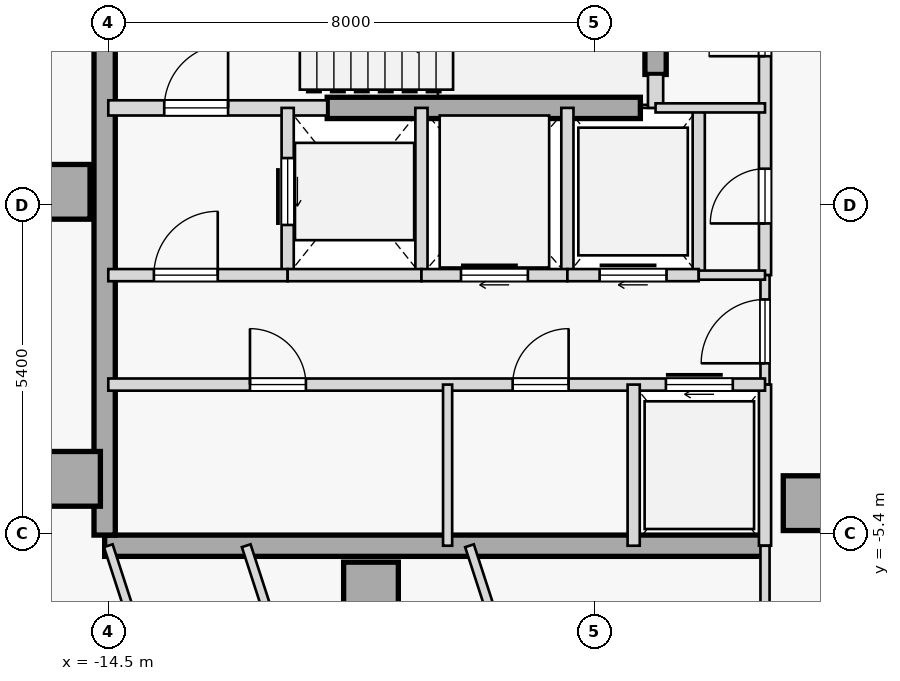
"""IFC4 building model, lengths in metres.
Left out: names, types, materials, properties, quantities, classifications, styles, units other than length and angle.
Written with IfcOpenShell. Run it as: python <this file> out.ifc"""

import sys

from ifc_helpers import new_model, si_unit, direction, frame, frame_2d, origin, origin_2d, place, context, subcontext, project, spatial, rectangle, extrude, element, fill, save


model = new_model("IFC4")
c1 = context("Model", 3, precision=1e-05, world=origin(), true_north=direction((0.0, 1.0)))
c2 = subcontext(c1, "Body", "Model", "MODEL_VIEW")
j1 = project(units=[si_unit("LENGTHUNIT", "METRE"), si_unit("PLANEANGLEUNIT", "RADIAN")], contexts=[c1])
p1 = place(None, origin())
s1 = spatial("IfcSite", under=j1, at=p1, CompositionType="ELEMENT")
p2 = place(p1, origin())
s2 = spatial("IfcBuilding", under=s1, at=p2, CompositionType="ELEMENT")
p3 = place(p2, frame((0.0, 0.0, 217.6)))
s3 = spatial("IfcBuildingStorey", under=s2, at=p3, CompositionType="ELEMENT", Elevation=217.6)
for number, where, z_axis, x_axis in (
    (1, (-15.25, 0.22, 0.0), (0.0, 0.0, 1.0), (1.0, 0.0, 0.0)),
    (2, (-15.08, -4.5, 0.0), (0.0, 0.0, 1.0), (1.0, 0.0, 0.0)),
    (3, (-10.18, -6.32, 0.0), (0.0, 0.0, 1.0), (1.0, 0.0, 0.0)),
    (4, (-2.95, -4.9, 0.0), (0.0, 0.0, 1.0), (1.0, 0.0, 0.0)),
):
    element("IfcColumn", number, at=place(p3, frame(where, z_axis=z_axis, x_axis=x_axis)), inside=s3, PredefinedType="COLUMN", context=c2, shape_type="SweptSolid", body=[
        extrude(rectangle(XDim=0.9, YDim=0.9, at=origin_2d()), origin(), (0.0, 0.0, 1.0), 3.35),
    ])
p4 = place(p3, frame((-14.56, -5.6, 0.0), z_axis=(0.0, 0.0, 1.0), x_axis=(1.0, 0.0, 0.0)))
e5 = element("IfcWall", 5, at=p4, inside=s3, PredefinedType="SHEAR", context=c2, shape_type="SweptSolid", body=[
    extrude(rectangle(XDim=10.86, YDim=0.35, at=frame_2d((5.43, 0.0))), origin(), (0.0, 0.0, 1.0), 3.125),
])
p5 = place(p3, frame((-14.56, -5.425, 0.0), z_axis=(0.0, 0.0, 1.0), x_axis=(0.0, 1.0, 0.0)))
e6 = element("IfcWall", 6, at=p5, inside=s3, PredefinedType="SHEAR", context=c2, shape_type="SweptSolid", body=[
    extrude(rectangle(XDim=10.85, YDim=0.35, at=frame_2d((5.425, 0.0))), origin(), (0.0, 0.0, 1.0), 3.125),
])
p6 = place(p3, frame((-5.5, 2.15, 0.0), z_axis=(0.0, 0.0, 1.0), x_axis=(0.0, 1.0, 0.0)))
e7 = element("IfcWall", 7, at=p6, inside=s3, PredefinedType="SHEAR", context=c2, shape_type="SweptSolid", body=[
    extrude(rectangle(XDim=3.275, YDim=0.35, at=frame_2d((1.638, 0.0))), origin(), (0.0, 0.0, 1.0), 3.125),
])
p7 = place(p3, frame((-10.9, 1.6, 0.0), z_axis=(0.0, 0.0, 1.0), x_axis=(1.0, 0.0, 0.0)))
e8 = element("IfcWall", 8, at=p7, inside=s3, PredefinedType="SHEAR", context=c2, shape_type="SweptSolid", body=[
    extrude(rectangle(XDim=5.15, YDim=0.35, at=frame_2d((2.575, 0.0))), origin(), (0.0, 0.0, 1.0), 3.125),
])
p8 = place(p3, frame((-14.5, 1.6, 0.0), z_axis=(0.0, 0.0, 1.0), x_axis=(1.0, 0.0, 0.0)))
e9 = element("IfcWall", 9, at=p8, inside=s3, PredefinedType="STANDARD", context=c2, shape_type="SweptSolid", body=[
    extrude(rectangle(XDim=3.6, YDim=0.25, at=frame_2d((1.8, 0.0))), origin(), (0.0, 0.0, 1.0), 3.125),
])
p9 = place(p8, frame((0.92, 0.0, 0.0)))
e10 = element("IfcOpeningElement", 10, at=p9, cuts=e9, PredefinedType="OPENING", context=c2, shape_type="SweptSolid", body=[
    extrude(rectangle(XDim=1.05, YDim=2.15, at=frame_2d((0.525, 1.075))), frame((0.0, 0.135, 0.0), z_axis=(0.0, -1.0, 0.0), x_axis=(1.0, 0.0, 0.0)), (0.0, 0.0, 1.0), 0.27),
])
p10 = place(p3, frame((-5.5, 1.6, 0.0), z_axis=(0.0, 0.0, 1.0), x_axis=(0.0, 1.0, 0.0)))
e11 = element("IfcWall", 11, at=p10, inside=s3, PredefinedType="STANDARD", context=c2, shape_type="SweptSolid", body=[
    extrude(rectangle(XDim=0.55, YDim=0.25, at=frame_2d((0.275, 0.0))), origin(), (0.0, 0.0, 1.0), 3.125),
])
p11 = place(p3, frame((-3.7, -1.15, 0.0), z_axis=(0.0, 0.0, 1.0), x_axis=(0.0, 1.0, 0.0)))
e12 = element("IfcWall", 12, at=p11, inside=s3, PredefinedType="STANDARD", context=c2, shape_type="SweptSolid", body=[
    extrude(rectangle(XDim=6.75, YDim=0.2, at=frame_2d((3.375, 0.0))), origin(), (0.0, 0.0, 1.0), 3.125),
])
p12 = place(p11, frame((3.6, 0.0, 0.0)))
e13 = element("IfcOpeningElement", 13, at=p12, cuts=e12, PredefinedType="OPENING", context=c2, shape_type="SweptSolid", body=[
    extrude(rectangle(XDim=0.92, YDim=2.15, at=frame_2d((0.46, 1.075))), frame((0.0, 0.11, 0.0), z_axis=(0.0, -1.0, 0.0), x_axis=(1.0, 0.0, 0.0)), (0.0, 0.0, 1.0), 0.22),
])
p13 = place(p11, frame((0.85, 0.0, 0.0)))
e14 = element("IfcOpeningElement", 14, at=p13, cuts=e12, PredefinedType="OPENING", context=c2, shape_type="SweptSolid", body=[
    extrude(rectangle(XDim=0.9, YDim=2.15, at=frame_2d((0.45, 1.075))), frame((0.0, 0.11, 0.0), z_axis=(0.0, -1.0, 0.0), x_axis=(1.0, 0.0, 0.0)), (0.0, 0.0, 1.0), 0.22),
])
p14 = place(p3, frame((-3.7, -2.95, 0.0), z_axis=(0.0, 0.0, 1.0), x_axis=(0.0, 1.0, 0.0)))
e15 = element("IfcWall", 15, at=p14, inside=s3, PredefinedType="PARTITIONING", context=c2, shape_type="SweptSolid", body=[
    extrude(rectangle(XDim=1.8, YDim=0.15, at=frame_2d((0.9, 0.0))), origin(), (0.0, 0.0, 1.0), 3.125),
])
p15 = place(p14, frame((0.35, 0.0, 0.0)))
e16 = element("IfcOpeningElement", 16, at=p15, cuts=e15, PredefinedType="OPENING", context=c2, shape_type="SweptSolid", body=[
    extrude(rectangle(XDim=1.05, YDim=2.18, at=frame_2d((0.525, 1.09))), frame((0.0, 0.085, 0.0), z_axis=(0.0, -1.0, 0.0), x_axis=(1.0, 0.0, 0.0)), (0.0, 0.0, 1.0), 0.17),
])
p16 = place(p3, frame((-3.7, -5.6, 0.0), z_axis=(0.0, 0.0, 1.0), x_axis=(0.0, 1.0, 0.0)))
e17 = element("IfcWall", 17, at=p16, inside=s3, PredefinedType="STANDARD", context=c2, shape_type="SweptSolid", body=[
    extrude(rectangle(XDim=2.65, YDim=0.2, at=frame_2d((1.325, 0.0))), origin(), (0.0, 0.0, 1.0), 3.125),
])
p17 = place(p3, frame((-11.55, -1.15, 0.0), z_axis=(0.0, 0.0, 1.0), x_axis=(0.0, 1.0, 0.0)))
e18 = element("IfcWall", 18, at=p17, inside=s3, PredefinedType="STANDARD", context=c2, shape_type="SweptSolid", body=[
    extrude(rectangle(XDim=2.75, YDim=0.2, at=frame_2d((1.375, 0.0))), origin(), (0.0, 0.0, 1.0), 3.125),
])
p18 = place(p17, frame((0.825, 0.0, 0.0)))
e19 = element("IfcOpeningElement", 19, at=p18, cuts=e18, PredefinedType="OPENING", context=c2, shape_type="SweptSolid", body=[
    extrude(rectangle(XDim=1.1, YDim=2.15, at=frame_2d((0.55, 1.075))), frame((0.0, 0.11, 0.0), z_axis=(0.0, -1.0, 0.0), x_axis=(1.0, 0.0, 0.0)), (0.0, 0.0, 1.0), 0.22),
])
p19 = place(p3, frame((-9.35, -1.15, 0.0), z_axis=(0.0, 0.0, 1.0), x_axis=(0.0, 1.0, 0.0)))
e20 = element("IfcWall", 20, at=p19, inside=s3, PredefinedType="STANDARD", context=c2, shape_type="SweptSolid", body=[
    extrude(rectangle(XDim=2.75, YDim=0.2, at=frame_2d((1.375, 0.0))), origin(), (0.0, 0.0, 1.0), 3.125),
])
p20 = place(p3, frame((-14.5, -1.15, 0.0), z_axis=(0.0, 0.0, 1.0), x_axis=(1.0, 0.0, 0.0)))
e21 = element("IfcWall", 21, at=p20, inside=s3, PredefinedType="STANDARD", context=c2, shape_type="SweptSolid", body=[
    extrude(rectangle(XDim=2.95, YDim=0.2, at=frame_2d((1.475, 0.0))), origin(), (0.0, 0.0, 1.0), 3.125),
])
p21 = place(p20, frame((0.75, 0.0, 0.0)))
e22 = element("IfcOpeningElement", 22, at=p21, cuts=e21, PredefinedType="OPENING", context=c2, shape_type="SweptSolid", body=[
    extrude(rectangle(XDim=1.05, YDim=2.18, at=frame_2d((0.525, 1.09))), frame((0.0, 0.11, 0.0), z_axis=(0.0, -1.0, 0.0), x_axis=(1.0, 0.0, 0.0)), (0.0, 0.0, 1.0), 0.22),
])
p22 = place(p3, frame((-11.55, -1.15, 0.0), z_axis=(0.0, 0.0, 1.0), x_axis=(1.0, 0.0, 0.0)))
e23 = element("IfcWall", 23, at=p22, inside=s3, PredefinedType="STANDARD", context=c2, shape_type="SweptSolid", body=[
    extrude(rectangle(XDim=2.2, YDim=0.2, at=frame_2d((1.1, 0.0))), origin(), (0.0, 0.0, 1.0), 3.125),
])
p23 = place(p3, frame((-6.95, -1.15, 0.0), z_axis=(0.0, 0.0, 1.0), x_axis=(0.0, 1.0, 0.0)))
e24 = element("IfcWall", 24, at=p23, inside=s3, PredefinedType="STANDARD", context=c2, shape_type="SweptSolid", body=[
    extrude(rectangle(XDim=2.75, YDim=0.2, at=frame_2d((1.375, 0.0))), origin(), (0.0, 0.0, 1.0), 3.125),
])
p24 = place(p3, frame((-9.35, -1.15, 0.0), z_axis=(0.0, 0.0, 1.0), x_axis=(1.0, 0.0, 0.0)))
e25 = element("IfcWall", 25, at=p24, inside=s3, PredefinedType="STANDARD", context=c2, shape_type="SweptSolid", body=[
    extrude(rectangle(XDim=2.4, YDim=0.2, at=frame_2d((1.2, 0.0))), origin(), (0.0, 0.0, 1.0), 3.125),
])
p25 = place(p24, frame((0.65, 0.0, 0.0)))
e26 = element("IfcOpeningElement", 26, at=p25, cuts=e25, PredefinedType="OPENING", context=c2, shape_type="SweptSolid", body=[
    extrude(rectangle(XDim=1.1, YDim=2.15, at=frame_2d((0.55, 1.075))), frame((0.0, 0.11, 0.0), z_axis=(0.0, -1.0, 0.0), x_axis=(1.0, 0.0, 0.0)), (0.0, 0.0, 1.0), 0.22),
])
p26 = place(p3, frame((-4.79, -1.15, 0.0), z_axis=(0.0, 0.0, 1.0), x_axis=(0.0, 1.0, 0.0)))
e27 = element("IfcWall", 27, at=p26, inside=s3, PredefinedType="STANDARD", context=c2, shape_type="SweptSolid", body=[
    extrude(rectangle(XDim=2.75, YDim=0.2, at=frame_2d((1.375, 0.0))), origin(), (0.0, 0.0, 1.0), 3.125),
])
p27 = place(p3, frame((-6.95, -1.15, 0.0), z_axis=(0.0, 0.0, 1.0), x_axis=(1.0, 0.0, 0.0)))
e28 = element("IfcWall", 28, at=p27, inside=s3, PredefinedType="STANDARD", context=c2, shape_type="SweptSolid", body=[
    extrude(rectangle(XDim=2.16, YDim=0.2, at=frame_2d((1.08, 0.0))), origin(), (0.0, 0.0, 1.0), 3.125),
])
p28 = place(p27, frame((0.53, 0.0, 0.0)))
e29 = element("IfcOpeningElement", 29, at=p28, cuts=e28, PredefinedType="OPENING", context=c2, shape_type="SweptSolid", body=[
    extrude(rectangle(XDim=1.1, YDim=2.15, at=frame_2d((0.55, 1.075))), frame((0.0, 0.11, 0.0), z_axis=(0.0, -1.0, 0.0), x_axis=(1.0, 0.0, 0.0)), (0.0, 0.0, 1.0), 0.22),
])
p29 = place(p3, frame((-4.79, -1.15, 0.0), z_axis=(0.0, 0.0, 1.0), x_axis=(1.0, 0.0, 0.0)))
e30 = element("IfcWall", 30, at=p29, inside=s3, PredefinedType="PARTITIONING", context=c2, shape_type="SweptSolid", body=[
    extrude(rectangle(XDim=1.09, YDim=0.15, at=frame_2d((0.545, 0.0))), origin(), (0.0, 0.0, 1.0), 3.125),
])
p30 = place(p3, frame((-14.5, -2.95, 0.0), z_axis=(0.0, 0.0, 1.0), x_axis=(1.0, 0.0, 0.0)))
e31 = element("IfcWall", 31, at=p30, inside=s3, PredefinedType="STANDARD", context=c2, shape_type="SweptSolid", body=[
    extrude(rectangle(XDim=10.8, YDim=0.2, at=frame_2d((5.4, 0.0))), origin(), (0.0, 0.0, 1.0), 3.125),
])
p31 = place(p30, frame((9.17, 0.0, 0.0)))
e32 = element("IfcOpeningElement", 32, at=p31, cuts=e31, PredefinedType="OPENING", context=c2, shape_type="SweptSolid", body=[
    extrude(rectangle(XDim=1.1, YDim=2.15, at=frame_2d((0.55, 1.075))), frame((0.0, 0.11, 0.0), z_axis=(0.0, -1.0, 0.0), x_axis=(1.0, 0.0, 0.0)), (0.0, 0.0, 1.0), 0.22),
])
p32 = place(p30, frame((2.33, 0.0, 0.0)))
e33 = element("IfcOpeningElement", 33, at=p32, cuts=e31, PredefinedType="OPENING", context=c2, shape_type="SweptSolid", body=[
    extrude(rectangle(XDim=0.92, YDim=2.15, at=frame_2d((0.46, 1.075))), frame((0.0, 0.11, 0.0), z_axis=(0.0, -1.0, 0.0), x_axis=(1.0, 0.0, 0.0)), (0.0, 0.0, 1.0), 0.22),
])
p33 = place(p30, frame((6.65, 0.0, 0.0)))
e34 = element("IfcOpeningElement", 34, at=p33, cuts=e31, PredefinedType="OPENING", context=c2, shape_type="SweptSolid", body=[
    extrude(rectangle(XDim=0.92, YDim=2.15, at=frame_2d((0.46, 1.075))), frame((0.0, 0.11, 0.0), z_axis=(0.0, -1.0, 0.0), x_axis=(1.0, 0.0, 0.0)), (0.0, 0.0, 1.0), 0.22),
])
p34 = place(p3, frame((-5.86, -5.6, 0.0), z_axis=(0.0, 0.0, 1.0), x_axis=(0.0, 1.0, 0.0)))
e35 = element("IfcWall", 35, at=p34, inside=s3, PredefinedType="STANDARD", context=c2, shape_type="SweptSolid", body=[
    extrude(rectangle(XDim=2.65, YDim=0.2, at=frame_2d((1.325, 0.0))), origin(), (0.0, 0.0, 1.0), 3.125),
])
p35 = place(p3, frame((-8.92, -5.6, 0.0), z_axis=(0.0, 0.0, 1.0), x_axis=(0.0, 1.0, 0.0)))
e36 = element("IfcWall", 36, at=p35, inside=s3, PredefinedType="PARTITIONING", context=c2, shape_type="SweptSolid", body=[
    extrude(rectangle(XDim=2.65, YDim=0.15, at=frame_2d((1.325, 0.0))), origin(), (0.0, 0.0, 1.0), 3.125),
])
p36 = place(p3, frame((-5.5, 1.6, 0.0), z_axis=(0.0, 0.0, 1.0), x_axis=(1.0, 0.0, 0.0)))
e37 = element("IfcWall", 37, at=p36, inside=s3, PredefinedType="PARTITIONING", context=c2, shape_type="SweptSolid", body=[
    extrude(rectangle(XDim=1.8, YDim=0.15, at=frame_2d((0.9, 0.0))), origin(), (0.0, 0.0, 1.0), 3.125),
])
p37 = place(p3, frame((-3.7, -11.514, 0.0), z_axis=(0.0, 0.0, 1.0), x_axis=(-8.2572974e-05, 0.999999996591, 0.0)))
e38 = element("IfcWall", 38, at=p37, inside=s3, PredefinedType="PARTITIONING", context=c2, shape_type="SweptSolid", body=[
    extrude(rectangle(XDim=5.913, YDim=0.15, at=frame_2d((2.957, 0.0))), origin(), (0.0, 0.0, 1.0), 3.125),
])
p38 = place(p37, frame((2.497, 0.0, 0.0)))
e39 = element("IfcOpeningElement", 39, at=p38, cuts=e38, PredefinedType="OPENING", context=c2, shape_type="SweptSolid", body=[
    extrude(rectangle(XDim=0.92, YDim=2.15, at=frame_2d((0.46, 1.075))), frame((0.0, 0.085, 0.0), z_axis=(0.0, -1.0, 0.0), x_axis=(1.0, 0.0, 0.0)), (0.0, 0.0, 1.0), 0.17),
])
p39 = place(p3, frame((-30.663, -9.757, 0.0), z_axis=(0.0, 0.0, 1.0), x_axis=(0.951058192995, 0.309011833974, 0.0)))
e40 = element("IfcWall", 40, at=p39, inside=s3, PredefinedType="PARTITIONING", context=c2, shape_type="SweptSolid", body=[
    extrude(rectangle(XDim=16.657, YDim=0.15, at=frame_2d((8.329, 0.0))), origin(), (0.0, 0.0, 1.0), 3.125),
])
p40 = place(p3, frame((-13.488, -8.713, 0.0), z_axis=(0.0, 0.0, 1.0), x_axis=(-0.309082700143, 0.951035164687, 0.0)))
e41 = element("IfcWall", 41, at=p40, inside=s3, PredefinedType="PARTITIONING", context=c2, shape_type="SweptSolid", body=[
    extrude(rectangle(XDim=3.274, YDim=0.15, at=frame_2d((1.637, 0.0))), origin(), (0.0, 0.0, 1.0), 3.125),
])
p41 = place(p3, frame((-9.679, -13.457, 0.0), z_axis=(0.0, 0.0, 1.0), x_axis=(-0.309010558951, 0.951058607267, 0.0)))
e42 = element("IfcWall", 42, at=p41, inside=s3, PredefinedType="PARTITIONING", context=c2, shape_type="SweptSolid", body=[
    extrude(rectangle(XDim=8.261, YDim=0.15, at=frame_2d((4.13, 0.0))), origin(), (0.0, 0.0, 1.0), 3.125),
])
p42 = place(p3, frame((-6.358, -12.377, 0.0), z_axis=(0.0, 0.0, 1.0), x_axis=(-0.309024097906, 0.951054208189, 0.0)))
e43 = element("IfcWall", 43, at=p42, inside=s3, PredefinedType="PARTITIONING", context=c2, shape_type="SweptSolid", body=[
    extrude(rectangle(XDim=7.126, YDim=0.15, at=frame_2d((3.563, 0.0))), origin(), (0.0, 0.0, 1.0), 2.675),
])
p43 = place(p9, origin())
e44 = element("IfcDoor", 44, at=p43, inside=s3, OperationType="SINGLE_SWING_RIGHT", PredefinedType="DOOR", context=c2, shape_type="SweptSolid", body=[
    extrude(rectangle(XDim=1.05, YDim=2.15, at=frame_2d((0.525, 1.075))), frame((0.0, 0.025, 0.0), z_axis=(0.0, -1.0, 0.0), x_axis=(1.0, 0.0, 0.0)), (0.0, 0.0, 1.0), 0.05),
])
fill(e10, e44)
p44 = place(p21, origin())
e45 = element("IfcDoor", 45, at=p44, inside=s3, OperationType="SINGLE_SWING_RIGHT", PredefinedType="DOOR", context=c2, shape_type="SweptSolid", body=[
    extrude(rectangle(XDim=1.05, YDim=2.18, at=frame_2d((0.525, 1.09))), frame((0.0, 0.025, 0.0), z_axis=(0.0, -1.0, 0.0), x_axis=(1.0, 0.0, 0.0)), (0.0, 0.0, 1.0), 0.05),
])
fill(e22, e45)
p45 = place(p15, origin())
e46 = element("IfcDoor", 46, at=p45, inside=s3, OperationType="SINGLE_SWING_LEFT", PredefinedType="DOOR", context=c2, shape_type="SweptSolid", body=[
    extrude(rectangle(XDim=1.05, YDim=2.18, at=frame_2d((0.525, 1.09))), frame((0.0, 0.025, 0.0), z_axis=(0.0, -1.0, 0.0), x_axis=(1.0, 0.0, 0.0)), (0.0, 0.0, 1.0), 0.05),
])
fill(e16, e46)
p46 = place(p18, origin())
e47 = element("IfcDoor", 47, at=p46, inside=s3, OperationType="SLIDING_TO_RIGHT", PredefinedType="DOOR", context=c2, shape_type="SweptSolid", body=[
    extrude(rectangle(XDim=1.1, YDim=2.15, at=frame_2d((0.55, 1.075))), frame((0.0, 0.025, 0.0), z_axis=(0.0, -1.0, 0.0), x_axis=(1.0, 0.0, 0.0)), (0.0, 0.0, 1.0), 0.05),
])
fill(e19, e47)
p47 = place(p25, origin())
e48 = element("IfcDoor", 48, at=p47, inside=s3, OperationType="SLIDING_TO_RIGHT", PredefinedType="DOOR", context=c2, shape_type="SweptSolid", body=[
    extrude(rectangle(XDim=1.1, YDim=2.15, at=frame_2d((0.55, 1.075))), frame((0.0, 0.025, 0.0), z_axis=(0.0, -1.0, 0.0), x_axis=(1.0, 0.0, 0.0)), (0.0, 0.0, 1.0), 0.05),
])
fill(e26, e48)
p48 = place(p28, origin())
e49 = element("IfcDoor", 49, at=p48, inside=s3, OperationType="SLIDING_TO_RIGHT", PredefinedType="DOOR", context=c2, shape_type="SweptSolid", body=[
    extrude(rectangle(XDim=1.1, YDim=2.15, at=frame_2d((0.55, 1.075))), frame((0.0, 0.025, 0.0), z_axis=(0.0, -1.0, 0.0), x_axis=(1.0, 0.0, 0.0)), (0.0, 0.0, 1.0), 0.05),
])
fill(e29, e49)
p49 = place(p31, origin())
e50 = element("IfcDoor", 50, at=p49, inside=s3, OperationType="SLIDING_TO_RIGHT", PredefinedType="DOOR", context=c2, shape_type="SweptSolid", body=[
    extrude(rectangle(XDim=1.1, YDim=2.15, at=frame_2d((0.55, 1.075))), frame((0.0, 0.025, 0.0), z_axis=(0.0, -1.0, 0.0), x_axis=(1.0, 0.0, 0.0)), (0.0, 0.0, 1.0), 0.05),
])
fill(e32, e50)
p50 = place(p32, origin())
e51 = element("IfcDoor", 51, at=p50, inside=s3, OperationType="SINGLE_SWING_LEFT", PredefinedType="DOOR", context=c2, shape_type="SweptSolid", body=[
    extrude(rectangle(XDim=0.92, YDim=2.15, at=frame_2d((0.46, 1.075))), frame((0.0, 0.025, 0.0), z_axis=(0.0, -1.0, 0.0), x_axis=(1.0, 0.0, 0.0)), (0.0, 0.0, 1.0), 0.05),
])
fill(e33, e51)
p51 = place(p33, origin())
e52 = element("IfcDoor", 52, at=p51, inside=s3, OperationType="SINGLE_SWING_RIGHT", PredefinedType="DOOR", context=c2, shape_type="SweptSolid", body=[
    extrude(rectangle(XDim=0.92, YDim=2.15, at=frame_2d((0.46, 1.075))), frame((0.0, 0.025, 0.0), z_axis=(0.0, -1.0, 0.0), x_axis=(1.0, 0.0, 0.0)), (0.0, 0.0, 1.0), 0.05),
])
fill(e34, e52)
p52 = place(p12, origin())
e53 = element("IfcDoor", 53, at=p52, inside=s3, OperationType="SINGLE_SWING_LEFT", PredefinedType="DOOR", context=c2, shape_type="SweptSolid", body=[
    extrude(rectangle(XDim=0.92, YDim=2.15, at=frame_2d((0.46, 1.075))), frame((0.0, 0.025, 0.0), z_axis=(0.0, -1.0, 0.0), x_axis=(1.0, 0.0, 0.0)), (0.0, 0.0, 1.0), 0.05),
])
fill(e13, e53)
p53 = place(p13, origin())
e54 = element("IfcDoor", 54, at=p53, inside=s3, OperationType="SINGLE_SWING_LEFT", PredefinedType="DOOR", context=c2, shape_type="SweptSolid", body=[
    extrude(rectangle(XDim=0.9, YDim=2.15, at=frame_2d((0.45, 1.075))), frame((0.0, 0.025, 0.0), z_axis=(0.0, -1.0, 0.0), x_axis=(1.0, 0.0, 0.0)), (0.0, 0.0, 1.0), 0.05),
])
fill(e14, e54)
save(model, sys.argv[1])
